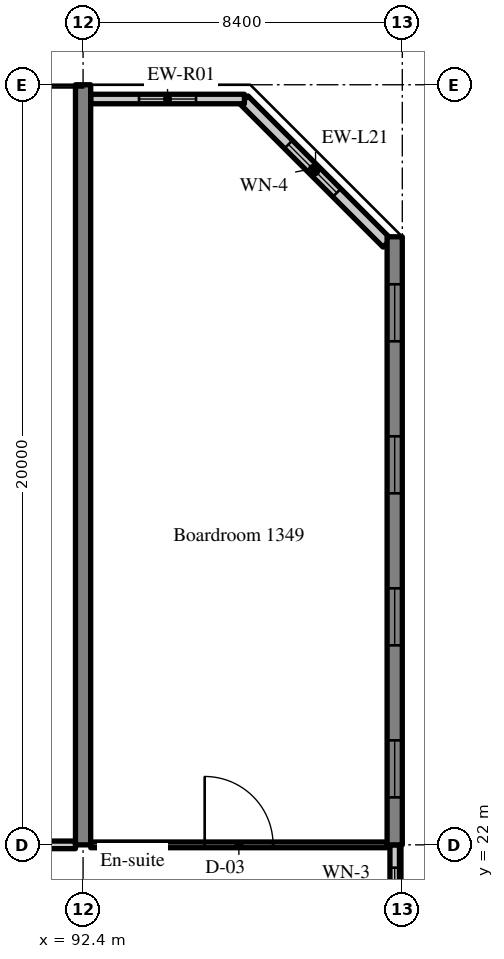
"""IFC4 building model, lengths in metres.
Left out: names, types, materials, properties, quantities, classifications, styles, units other than length and angle.
Written with IfcOpenShell. Run it as: python <this file> out.ifc"""

import sys

from ifc_helpers import new_model, si_unit, direction, frame, frame_2d, origin, place, context, subcontext, project, spatial, rectangle, extrude, source, transform, mapped, element, fill, save


model = new_model("IFC4")
c1 = context("Model", 3, precision=1e-05, world=origin(), true_north=direction((0.0, 1.0)))
c2 = subcontext(c1, "Body", "Model", "MODEL_VIEW")
j1 = project(units=[si_unit("LENGTHUNIT", "METRE"), si_unit("PLANEANGLEUNIT", "RADIAN")], contexts=[c1])
p1 = place(None, origin())
s1 = spatial("IfcSite", under=j1, at=p1, CompositionType="ELEMENT")
p2 = place(p1, origin())
s2 = spatial("IfcBuilding", under=s1, at=p2, CompositionType="ELEMENT")
p3 = place(p2, frame((0.0, 0.0, 58.2)))
s3 = spatial("IfcBuildingStorey", under=s2, at=p3, CompositionType="ELEMENT", Elevation=58.2)
m1 = source(origin(), c2, "Body", "SweptSolid", [
    extrude(rectangle(XDim=20.0, YDim=0.4, at=frame_2d((10.0, 0.0))), origin(), (0.0, 0.0, 1.0), 3.52),
])
p4 = place(p3, frame((92.4, 22.0, 0.0), z_axis=(0.0, 0.0, 1.0), x_axis=(0.0, 1.0, 0.0)))
e1 = element("IfcWall", 1, at=p4, inside=s3, PredefinedType="SHEAR", context=c2, shape_type="MappedRepresentation", body=[
    mapped(m1, transform((0.0, 0.0, 0.0), scale=1.0)),
])
m2 = source(origin(), c2, "Body", "SweptSolid", [
    extrude(rectangle(XDim=16.0, YDim=0.4, at=frame_2d((8.0, 0.0))), origin(), (0.0, 0.0, 1.0), 3.52),
])
p5 = place(p3, frame((100.6, 22.0, 0.0), z_axis=(0.0, 0.0, 1.0), x_axis=(0.0, 1.0, 0.0)))
e2 = element("IfcWall", 2, at=p5, inside=s3, PredefinedType="SHEAR", context=c2, shape_type="MappedRepresentation", body=[
    mapped(m2, transform((0.0, 0.0, 0.0), scale=1.0)),
])
m3 = source(origin(), c2, "Body", "SweptSolid", [
    extrude(rectangle(XDim=1.5, YDim=1.5, at=frame_2d((0.75, 0.75))), frame((0.0, 0.21, 0.0), z_axis=(0.0, -1.0, 0.0), x_axis=(1.0, 0.0, 0.0)), (0.0, 0.0, 1.0), 0.42),
])
p6 = place(p5, frame((1.25, 0.0, 0.9)))
e3 = element("IfcOpeningElement", 3, at=p6, cuts=e2, PredefinedType="OPENING", context=c2, shape_type="MappedRepresentation", body=[
    mapped(m3, transform((0.0, 0.0, 0.0), scale=1.0)),
])
p7 = place(p5, frame((5.25, 0.0, 0.9)))
e4 = element("IfcOpeningElement", 4, at=p7, cuts=e2, PredefinedType="OPENING", context=c2, shape_type="MappedRepresentation", body=[
    mapped(m3, transform((0.0, 0.0, 0.0), scale=1.0)),
])
p8 = place(p5, frame((9.25, 0.0, 0.9)))
e5 = element("IfcOpeningElement", 5, at=p8, cuts=e2, PredefinedType="OPENING", context=c2, shape_type="MappedRepresentation", body=[
    mapped(m3, transform((0.0, 0.0, 0.0), scale=1.0)),
])
p9 = place(p5, frame((13.25, 0.0, 0.9)))
e6 = element("IfcOpeningElement", 6, at=p9, cuts=e2, PredefinedType="OPENING", context=c2, shape_type="MappedRepresentation", body=[
    mapped(m3, transform((0.0, 0.0, 0.0), scale=1.0)),
])
m4 = source(origin(), c2, "Body", "SweptSolid", [
    extrude(rectangle(XDim=5.326, YDim=0.3, at=frame_2d((2.663, 0.0))), origin(), (0.0, 0.0, 1.0), 3.52),
])
p10 = place(p3, frame((100.4, 37.834, 0.0), z_axis=(0.0, 0.0, 1.0), x_axis=(-0.707083859269, 0.707129702361, 0.0)))
e7 = element("IfcWall", 7, at=p10, inside=s3, PredefinedType="SOLIDWALL", context=c2, shape_type="MappedRepresentation", body=[
    mapped(m4, transform((0.0, 0.0, 0.0), scale=1.0)),
])
m5 = source(origin(), c2, "Body", "SweptSolid", [
    extrude(rectangle(XDim=1.8, YDim=1.5, at=frame_2d((0.9, 0.75))), frame((0.0, 0.16, 0.0), z_axis=(0.0, -1.0, 0.0), x_axis=(1.0, 0.0, 0.0)), (0.0, 0.0, 1.0), 0.32),
])
p11 = place(p10, frame((1.871, 0.0, 0.9)))
e8 = element("IfcOpeningElement", 8, at=p11, cuts=e7, PredefinedType="OPENING", context=c2, shape_type="MappedRepresentation", body=[
    mapped(m5, transform((0.0, 0.0, 0.0), scale=1.0)),
])
m6 = source(origin(), c2, "Body", "SweptSolid", [
    extrude(rectangle(XDim=4.045, YDim=0.25, at=frame_2d((2.022, 0.0))), origin(), (0.0, 0.0, 1.0), 2.82),
])
p12 = place(p3, frame((96.645, 41.625, 0.0), z_axis=(0.0, 0.0, 1.0), x_axis=(-1.0, 0.0, 0.0)))
e9 = element("IfcWall", 9, at=p12, inside=s3, PredefinedType="SOLIDWALL", context=c2, shape_type="MappedRepresentation", body=[
    mapped(m6, transform((0.0, 0.0, 0.0), scale=1.0)),
])
m7 = source(origin(), c2, "Body", "SweptSolid", [
    extrude(rectangle(XDim=1.5, YDim=1.5, at=frame_2d((0.75, 0.75))), frame((0.0, 0.135, 0.0), z_axis=(0.0, -1.0, 0.0), x_axis=(1.0, 0.0, 0.0)), (0.0, 0.0, 1.0), 0.27),
])
p13 = place(p12, frame((1.272, 0.0, 0.9)))
e10 = element("IfcOpeningElement", 10, at=p13, cuts=e9, PredefinedType="OPENING", context=c2, shape_type="MappedRepresentation", body=[
    mapped(m7, transform((0.0, 0.0, 0.0), scale=1.0)),
])
m8 = source(origin(), c2, "Body", "SweptSolid", [
    extrude(rectangle(XDim=2.4, YDim=0.25, at=frame_2d((1.2, 0.0))), origin(), (0.0, 0.0, 1.0), 2.62),
])
p14 = place(p3, frame((100.6, 19.6, 0.0), z_axis=(0.0, 0.0, 1.0), x_axis=(0.0, 1.0, 0.0)))
e11 = element("IfcWall", 11, at=p14, inside=s3, PredefinedType="SOLIDWALL", context=c2, shape_type="MappedRepresentation", body=[
    mapped(m8, transform((0.0, 0.0, 0.0), scale=1.0)),
])
m9 = source(origin(), c2, "Body", "SweptSolid", [
    extrude(rectangle(XDim=1.2, YDim=1.5, at=frame_2d((0.6, 0.75))), frame((0.0, 0.135, 0.0), z_axis=(0.0, -1.0, 0.0), x_axis=(1.0, 0.0, 0.0)), (0.0, 0.0, 1.0), 0.27),
])
p15 = place(p14, frame((0.6, 0.0, 0.9)))
e12 = element("IfcOpeningElement", 12, at=p15, cuts=e11, PredefinedType="OPENING", context=c2, shape_type="MappedRepresentation", body=[
    mapped(m9, transform((0.0, 0.0, 0.0), scale=1.0)),
])
m10 = source(origin(), c2, "Body", "SweptSolid", [
    extrude(rectangle(XDim=7.8, YDim=0.15, at=frame_2d((3.9, 0.0))), origin(), (0.0, 0.0, 1.0), 2.82),
])
p16 = place(p3, frame((92.6, 22.0, 0.0), z_axis=(0.0, 0.0, 1.0), x_axis=(1.0, 0.0, 0.0)))
e13 = element("IfcWall", 13, at=p16, inside=s3, PredefinedType="PARTITIONING", context=c2, shape_type="MappedRepresentation", body=[
    mapped(m10, transform((0.0, 0.0, 0.0), scale=1.0)),
])
m11 = source(origin(), c2, "Body", "SweptSolid", [
    extrude(rectangle(XDim=1.8, YDim=2.1, at=frame_2d((0.9, 1.05))), frame((0.0, 0.085, 0.0), z_axis=(0.0, -1.0, 0.0), x_axis=(1.0, 0.0, 0.0)), (0.0, 0.0, 1.0), 0.17),
])
p17 = place(p16, frame((3.0, 0.0, 0.0)))
e14 = element("IfcOpeningElement", 14, at=p17, cuts=e13, PredefinedType="OPENING", context=c2, shape_type="MappedRepresentation", body=[
    mapped(m11, transform((0.0, 0.0, 0.0), scale=1.0)),
])
m12 = source(origin(), c2, "Body", "SweptSolid", [
    extrude(rectangle(XDim=8.0, YDim=0.2, at=frame_2d((4.0, 0.0))), origin(), (0.0, 0.0, 1.0), 2.82),
])
p18 = place(p3, frame((84.2, 22.0, 0.0), z_axis=(0.0, 0.0, 1.0), x_axis=(1.0, 0.0, 0.0)))
e15 = element("IfcWall", 15, at=p18, inside=s3, PredefinedType="PARTITIONING", context=c2, shape_type="MappedRepresentation", body=[
    mapped(m12, transform((0.0, 0.0, 0.0), scale=1.0)),
])
m13 = source(origin(), c2, "Body", "SweptSolid", [
    extrude(rectangle(XDim=1.8, YDim=1.5, at=frame_2d((0.9, 0.75))), frame((0.0, 0.03, 0.0), z_axis=(0.0, -1.0, 0.0), x_axis=(1.0, 0.0, 0.0)), (0.0, 0.0, 1.0), 0.06),
])
p19 = place(p11, origin())
e16 = element("IfcWindow", 16, at=p19, inside=s3, PartitioningType="SINGLE_PANEL", PredefinedType="WINDOW", context=c2, shape_type="MappedRepresentation", body=[
    mapped(m13, transform((0.0, 0.0, 0.0), scale=1.0)),
])
fill(e8, e16)
m14 = source(origin(), c2, "Body", "SweptSolid", [
    extrude(rectangle(XDim=1.5, YDim=1.5, at=frame_2d((0.75, 0.75))), frame((0.0, 0.03, 0.0), z_axis=(0.0, -1.0, 0.0), x_axis=(1.0, 0.0, 0.0)), (0.0, 0.0, 1.0), 0.06),
])
p20 = place(p13, origin())
e17 = element("IfcWindow", 17, at=p20, inside=s3, PartitioningType="SINGLE_PANEL", PredefinedType="WINDOW", context=c2, shape_type="MappedRepresentation", body=[
    mapped(m14, transform((0.0, 0.0, 0.0), scale=1.0)),
])
fill(e10, e17)
p21 = place(p6, origin())
e18 = element("IfcWindow", 18, at=p21, inside=s3, PartitioningType="SINGLE_PANEL", PredefinedType="WINDOW", context=c2, shape_type="MappedRepresentation", body=[
    mapped(m14, transform((0.0, 0.0, 0.0), scale=1.0)),
])
fill(e3, e18)
p22 = place(p7, origin())
e19 = element("IfcWindow", 19, at=p22, inside=s3, PartitioningType="SINGLE_PANEL", PredefinedType="WINDOW", context=c2, shape_type="MappedRepresentation", body=[
    mapped(m14, transform((0.0, 0.0, 0.0), scale=1.0)),
])
fill(e4, e19)
p23 = place(p8, origin())
e20 = element("IfcWindow", 20, at=p23, inside=s3, PartitioningType="SINGLE_PANEL", PredefinedType="WINDOW", context=c2, shape_type="MappedRepresentation", body=[
    mapped(m14, transform((0.0, 0.0, 0.0), scale=1.0)),
])
fill(e5, e20)
p24 = place(p9, origin())
e21 = element("IfcWindow", 21, at=p24, inside=s3, PartitioningType="SINGLE_PANEL", PredefinedType="WINDOW", context=c2, shape_type="MappedRepresentation", body=[
    mapped(m14, transform((0.0, 0.0, 0.0), scale=1.0)),
])
fill(e6, e21)
m15 = source(origin(), c2, "Body", "SweptSolid", [
    extrude(rectangle(XDim=1.2, YDim=1.5, at=frame_2d((0.6, 0.75))), frame((0.0, 0.03, 0.0), z_axis=(0.0, -1.0, 0.0), x_axis=(1.0, 0.0, 0.0)), (0.0, 0.0, 1.0), 0.06),
])
p25 = place(p15, origin())
e22 = element("IfcWindow", 22, at=p25, inside=s3, PartitioningType="SINGLE_PANEL", PredefinedType="WINDOW", context=c2, shape_type="MappedRepresentation", body=[
    mapped(m15, transform((0.0, 0.0, 0.0), scale=1.0)),
])
fill(e12, e22)
m16 = source(origin(), c2, "Body", "SweptSolid", [
    extrude(rectangle(XDim=1.8, YDim=2.1, at=frame_2d((0.9, 1.05))), frame((0.0, 0.025, 0.0), z_axis=(0.0, -1.0, 0.0), x_axis=(1.0, 0.0, 0.0)), (0.0, 0.0, 1.0), 0.05),
])
p26 = place(p17, origin())
e23 = element("IfcDoor", 23, at=p26, inside=s3, OperationType="DOUBLE_DOOR_SINGLE_SWING", PredefinedType="DOOR", context=c2, shape_type="MappedRepresentation", body=[
    mapped(m16, transform((0.0, 0.0, 0.0), scale=1.0)),
])
fill(e14, e23)
save(model, sys.argv[1])
